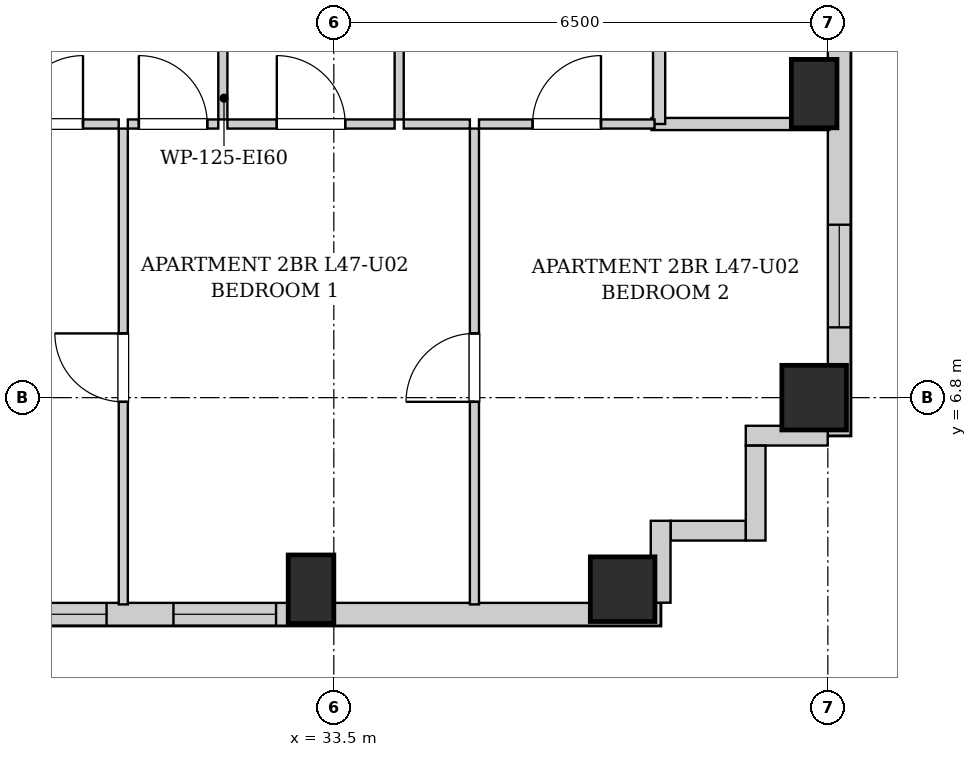
"""IFC4 building model, lengths in metres.
Left out: names, types, materials, properties, quantities, classifications, styles, units other than length and angle.
Written with IfcOpenShell. Run it as: python <this file> out.ifc"""

import sys

from ifc_helpers import new_model, si_unit, direction, frame, frame_2d, origin, origin_2d, place, context, subcontext, project, spatial, rectangle, extrude, element, fill, save


model = new_model("IFC4")
c1 = context("Model", 3, precision=1e-05, world=origin(), true_north=direction((0.0, 1.0)))
c2 = subcontext(c1, "Body", "Model", "MODEL_VIEW")
j1 = project(units=[si_unit("LENGTHUNIT", "METRE"), si_unit("PLANEANGLEUNIT", "RADIAN")], contexts=[c1])
p1 = place(None, origin())
s1 = spatial("IfcSite", under=j1, at=p1, CompositionType="ELEMENT")
p2 = place(p1, origin())
s2 = spatial("IfcBuilding", under=s1, at=p2, CompositionType="ELEMENT")
p3 = place(p2, frame((0.0, 0.0, 163.4)))
s3 = spatial("IfcBuildingStorey", under=s2, at=p3, CompositionType="ELEMENT", Elevation=163.4)
p4 = place(p3, frame((33.2, 4.28, 0.0), z_axis=(0.0, 0.0, 1.0), x_axis=(1.0, 0.0, 0.0)))
e1 = element("IfcColumn", 1, at=p4, inside=s3, PredefinedType="COLUMN", context=c2, shape_type="SweptSolid", body=[
    extrude(rectangle(XDim=0.6, YDim=0.9, at=origin_2d()), origin(), (0.0, 0.0, 1.0), 3.25),
])
for number, where, z_axis, x_axis in (
    (2, (37.3, 4.28, 0.0), (0.0, 0.0, 1.0), (1.0, 0.0, 0.0)),
    (3, (39.82, 6.8, 0.0), (0.0, 0.0, 1.0), (1.0, 0.0, 0.0)),
):
    element("IfcColumn", number, at=place(p3, frame(where, z_axis=z_axis, x_axis=x_axis)), inside=s3, PredefinedType="COLUMN", context=c2, shape_type="SweptSolid", body=[
        extrude(rectangle(XDim=0.85, YDim=0.85, at=origin_2d()), origin(), (0.0, 0.0, 1.0), 3.25),
    ])
p5 = place(p3, frame((39.82, 10.8, 0.0), z_axis=(0.0, 0.0, 1.0), x_axis=(1.0, 0.0, 0.0)))
e4 = element("IfcColumn", 4, at=p5, inside=s3, PredefinedType="COLUMN", context=c2, shape_type="SweptSolid", body=[
    extrude(rectangle(XDim=0.6, YDim=0.9, at=origin_2d()), origin(), (0.0, 0.0, 1.0), 3.25),
])
p6 = place(p3, frame((40.15, 40.8, 0.0), z_axis=(0.0, 0.0, 1.0), x_axis=(0.0, -1.0, 0.0)))
e5 = element("IfcWall", 5, at=p6, inside=s3, PredefinedType="SOLIDWALL", context=c2, shape_type="SweptSolid", body=[
    extrude(rectangle(XDim=34.5, YDim=0.3, at=frame_2d((17.25, 0.0))), origin(), (0.0, 0.0, 1.0), 2.99),
])
p7 = place(p6, frame((31.725, 0.0, 0.55)))
e6 = element("IfcOpeningElement", 6, at=p7, cuts=e5, PredefinedType="OPENING", context=c2, shape_type="SweptSolid", body=[
    extrude(rectangle(XDim=1.35, YDim=1.2, at=frame_2d((0.675, 0.6))), frame((0.0, 0.16, 0.0), z_axis=(0.0, -1.0, 0.0), x_axis=(1.0, 0.0, 0.0)), (0.0, 0.0, 1.0), 0.32),
])
p8 = place(p6, frame((3.0, 0.0, 0.55)))
e7 = element("IfcOpeningElement", 7, at=p8, cuts=e5, PredefinedType="OPENING", context=c2, shape_type="SweptSolid", body=[
    extrude(rectangle(XDim=1.35, YDim=1.2, at=frame_2d((0.675, 0.6))), frame((0.0, 0.16, 0.0), z_axis=(0.0, -1.0, 0.0), x_axis=(1.0, 0.0, 0.0)), (0.0, 0.0, 1.0), 0.32),
])
p9 = place(p6, frame((1.085, 0.0, 0.55)))
e8 = element("IfcOpeningElement", 8, at=p9, cuts=e5, PredefinedType="OPENING", context=c2, shape_type="SweptSolid", body=[
    extrude(rectangle(XDim=1.35, YDim=1.2, at=frame_2d((0.675, 0.6))), frame((0.0, 0.16, 0.0), z_axis=(0.0, -1.0, 0.0), x_axis=(1.0, 0.0, 0.0)), (0.0, 0.0, 1.0), 0.32),
])
p10 = place(p6, frame((21.3, 0.0, 0.55)))
e9 = element("IfcOpeningElement", 9, at=p10, cuts=e5, PredefinedType="OPENING", context=c2, shape_type="SweptSolid", body=[
    extrude(rectangle(XDim=1.35, YDim=1.2, at=frame_2d((0.675, 0.6))), frame((0.0, 0.16, 0.0), z_axis=(0.0, -1.0, 0.0), x_axis=(1.0, 0.0, 0.0)), (0.0, 0.0, 1.0), 0.32),
])
p11 = place(p6, frame((22.91, 0.0, 0.55)))
e10 = element("IfcOpeningElement", 10, at=p11, cuts=e5, PredefinedType="OPENING", context=c2, shape_type="SweptSolid", body=[
    extrude(rectangle(XDim=1.35, YDim=1.2, at=frame_2d((0.675, 0.6))), frame((0.0, 0.16, 0.0), z_axis=(0.0, -1.0, 0.0), x_axis=(1.0, 0.0, 0.0)), (0.0, 0.0, 1.0), 0.32),
])
p12 = place(p6, frame((14.175, 0.0, 0.55)))
e11 = element("IfcOpeningElement", 11, at=p12, cuts=e5, PredefinedType="OPENING", context=c2, shape_type="SweptSolid", body=[
    extrude(rectangle(XDim=1.35, YDim=1.2, at=frame_2d((0.675, 0.6))), frame((0.0, 0.16, 0.0), z_axis=(0.0, -1.0, 0.0), x_axis=(1.0, 0.0, 0.0)), (0.0, 0.0, 1.0), 0.32),
])
p13 = place(p6, frame((12.41, 0.0, 0.55)))
e12 = element("IfcOpeningElement", 12, at=p13, cuts=e5, PredefinedType="OPENING", context=c2, shape_type="SweptSolid", body=[
    extrude(rectangle(XDim=1.35, YDim=1.2, at=frame_2d((0.675, 0.6))), frame((0.0, 0.16, 0.0), z_axis=(0.0, -1.0, 0.0), x_axis=(1.0, 0.0, 0.0)), (0.0, 0.0, 1.0), 0.32),
])
p14 = place(p3, frame((37.8, 3.95, 0.0), z_axis=(0.0, 0.0, 1.0), x_axis=(-1.0, 0.0, 0.0)))
e13 = element("IfcWall", 13, at=p14, inside=s3, PredefinedType="SOLIDWALL", context=c2, shape_type="SweptSolid", body=[
    extrude(rectangle(XDim=20.15, YDim=0.3, at=frame_2d((10.075, 0.0))), origin(), (0.0, 0.0, 1.0), 2.99),
])
p15 = place(p14, frame((15.3, 0.0, 0.55)))
e14 = element("IfcOpeningElement", 14, at=p15, cuts=e13, PredefinedType="OPENING", context=c2, shape_type="SweptSolid", body=[
    extrude(rectangle(XDim=1.35, YDim=1.2, at=frame_2d((0.675, 0.6))), frame((0.0, 0.16, 0.0), z_axis=(0.0, -1.0, 0.0), x_axis=(1.0, 0.0, 0.0)), (0.0, 0.0, 1.0), 0.32),
])
p16 = place(p14, frame((16.91, 0.0, 0.55)))
e15 = element("IfcOpeningElement", 15, at=p16, cuts=e13, PredefinedType="OPENING", context=c2, shape_type="SweptSolid", body=[
    extrude(rectangle(XDim=1.35, YDim=1.2, at=frame_2d((0.675, 0.6))), frame((0.0, 0.16, 0.0), z_axis=(0.0, -1.0, 0.0), x_axis=(1.0, 0.0, 0.0)), (0.0, 0.0, 1.0), 0.32),
])
p17 = place(p14, frame((8.95, 0.0, 0.55)))
e16 = element("IfcOpeningElement", 16, at=p17, cuts=e13, PredefinedType="OPENING", context=c2, shape_type="SweptSolid", body=[
    extrude(rectangle(XDim=1.35, YDim=1.2, at=frame_2d((0.675, 0.6))), frame((0.0, 0.16, 0.0), z_axis=(0.0, -1.0, 0.0), x_axis=(1.0, 0.0, 0.0)), (0.0, 0.0, 1.0), 0.32),
])
p18 = place(p14, frame((7.29, 0.0, 0.55)))
e17 = element("IfcOpeningElement", 17, at=p18, cuts=e13, PredefinedType="OPENING", context=c2, shape_type="SweptSolid", body=[
    extrude(rectangle(XDim=1.35, YDim=1.2, at=frame_2d((0.675, 0.6))), frame((0.0, 0.16, 0.0), z_axis=(0.0, -1.0, 0.0), x_axis=(1.0, 0.0, 0.0)), (0.0, 0.0, 1.0), 0.32),
])
p19 = place(p14, frame((5.06, 0.0, 0.55)))
e18 = element("IfcOpeningElement", 18, at=p19, cuts=e13, PredefinedType="OPENING", context=c2, shape_type="SweptSolid", body=[
    extrude(rectangle(XDim=1.35, YDim=1.2, at=frame_2d((0.675, 0.6))), frame((0.0, 0.16, 0.0), z_axis=(0.0, -1.0, 0.0), x_axis=(1.0, 0.0, 0.0)), (0.0, 0.0, 1.0), 0.32),
])
p20 = place(p3, frame((39.998, 6.3, 0.0), z_axis=(0.0, 0.0, 1.0), x_axis=(-1.0, 0.0, 0.0)))
e19 = element("IfcWall", 19, at=p20, inside=s3, PredefinedType="SOLIDWALL", context=c2, shape_type="SweptSolid", body=[
    extrude(rectangle(XDim=1.078, YDim=0.26, at=frame_2d((0.539, 0.0))), origin(), (0.0, 0.0, 1.0), 2.99),
])
p21 = place(p3, frame((39.05, 6.168, 0.0), z_axis=(0.0, 0.0, 1.0), x_axis=(0.0, -1.0, 0.0)))
e20 = element("IfcWall", 20, at=p21, inside=s3, PredefinedType="SOLIDWALL", context=c2, shape_type="SweptSolid", body=[
    extrude(rectangle(XDim=1.248, YDim=0.26, at=frame_2d((0.624, 0.0))), origin(), (0.0, 0.0, 1.0), 2.99),
])
p22 = place(p3, frame((38.918, 5.05, 0.0), z_axis=(0.0, 0.0, 1.0), x_axis=(-1.0, 0.0, 0.0)))
e21 = element("IfcWall", 21, at=p22, inside=s3, PredefinedType="SOLIDWALL", context=c2, shape_type="SweptSolid", body=[
    extrude(rectangle(XDim=0.986, YDim=0.26, at=frame_2d((0.493, 0.0))), origin(), (0.0, 0.0, 1.0), 2.99),
])
p23 = place(p3, frame((37.8, 5.18, 0.0), z_axis=(0.0, 0.0, 1.0), x_axis=(0.0, -1.0, 0.0)))
e22 = element("IfcWall", 22, at=p23, inside=s3, PredefinedType="SOLIDWALL", context=c2, shape_type="SweptSolid", body=[
    extrude(rectangle(XDim=1.078, YDim=0.26, at=frame_2d((0.539, 0.0))), origin(), (0.0, 0.0, 1.0), 2.99),
])
p24 = place(p3, frame((37.68, 10.4, 0.0), z_axis=(0.0, 0.0, 1.0), x_axis=(1.0, 0.0, 0.0)))
e23 = element("IfcWall", 23, at=p24, inside=s3, PredefinedType="PARTITIONING", context=c2, shape_type="SweptSolid", body=[
    extrude(rectangle(XDim=2.34, YDim=0.16, at=frame_2d((1.17, 0.0))), origin(), (0.0, 0.0, 1.0), 2.99),
])
p25 = place(p3, frame((37.78, 10.4, 0.0), z_axis=(0.0, 0.0, 1.0), x_axis=(0.0, 1.0, 0.0)))
e24 = element("IfcWall", 24, at=p25, inside=s3, PredefinedType="PARTITIONING", context=c2, shape_type="SweptSolid", body=[
    extrude(rectangle(XDim=2.91, YDim=0.16, at=frame_2d((1.455, 0.0))), origin(), (0.0, 0.0, 1.0), 2.99),
])
p26 = place(p3, frame((32.04, 10.46, 0.0), z_axis=(0.0, 0.0, 1.0), x_axis=(0.0, 1.0, 0.0)))
e25 = element("IfcWall", 25, at=p26, inside=s3, PredefinedType="PARTITIONING", context=c2, shape_type="SweptSolid", body=[
    extrude(rectangle(XDim=2.85, YDim=0.12, at=frame_2d((1.425, 0.0))), origin(), (0.0, 0.0, 1.0), 2.99),
])
p27 = place(p26, frame((0.975, 0.0, 0.0)))
e26 = element("IfcOpeningElement", 26, at=p27, cuts=e25, PredefinedType="OPENING", context=c2, shape_type="SweptSolid", body=[
    extrude(rectangle(XDim=0.9, YDim=2.05, at=frame_2d((0.45, 1.025))), frame((0.0, 0.07, 0.0), z_axis=(0.0, -1.0, 0.0), x_axis=(1.0, 0.0, 0.0)), (0.0, 0.0, 1.0), 0.14),
])
p28 = place(p3, frame((28.83, 10.4, 0.0), z_axis=(0.0, 0.0, 1.0), x_axis=(1.0, 0.0, 0.0)))
e27 = element("IfcWall", 27, at=p28, inside=s3, PredefinedType="PARTITIONING", context=c2, shape_type="SweptSolid", body=[
    extrude(rectangle(XDim=1.84, YDim=0.12, at=frame_2d((0.92, 0.0))), origin(), (0.0, 0.0, 1.0), 2.99),
])
p29 = place(p28, frame((0.47, 0.0, 0.0)))
e28 = element("IfcOpeningElement", 28, at=p29, cuts=e27, PredefinedType="OPENING", context=c2, shape_type="SweptSolid", body=[
    extrude(rectangle(XDim=0.9, YDim=2.05, at=frame_2d((0.45, 1.025))), frame((0.0, 0.07, 0.0), z_axis=(0.0, -1.0, 0.0), x_axis=(1.0, 0.0, 0.0)), (0.0, 0.0, 1.0), 0.14),
])
p30 = place(p3, frame((30.79, 10.4, 0.0), z_axis=(0.0, 0.0, 1.0), x_axis=(1.0, 0.0, 0.0)))
e29 = element("IfcWall", 29, at=p30, inside=s3, PredefinedType="PARTITIONING", context=c2, shape_type="SweptSolid", body=[
    extrude(rectangle(XDim=1.19, YDim=0.12, at=frame_2d((0.595, 0.0))), origin(), (0.0, 0.0, 1.0), 2.99),
])
p31 = place(p30, frame((0.145, 0.0, 0.0)))
e30 = element("IfcOpeningElement", 30, at=p31, cuts=e29, PredefinedType="OPENING", context=c2, shape_type="SweptSolid", body=[
    extrude(rectangle(XDim=0.9, YDim=2.05, at=frame_2d((0.45, 1.025))), frame((0.0, 0.07, 0.0), z_axis=(0.0, -1.0, 0.0), x_axis=(1.0, 0.0, 0.0)), (0.0, 0.0, 1.0), 0.14),
])
p32 = place(p3, frame((34.36, 10.46, 0.0), z_axis=(0.0, 0.0, 1.0), x_axis=(0.0, 1.0, 0.0)))
e31 = element("IfcWall", 31, at=p32, inside=s3, PredefinedType="PARTITIONING", context=c2, shape_type="SweptSolid", body=[
    extrude(rectangle(XDim=2.85, YDim=0.12, at=frame_2d((1.425, 0.0))), origin(), (0.0, 0.0, 1.0), 2.99),
])
p33 = place(p32, frame((0.975, 0.0, 0.0)))
e32 = element("IfcOpeningElement", 32, at=p33, cuts=e31, PredefinedType="OPENING", context=c2, shape_type="SweptSolid", body=[
    extrude(rectangle(XDim=0.9, YDim=2.05, at=frame_2d((0.45, 1.025))), frame((0.0, 0.07, 0.0), z_axis=(0.0, -1.0, 0.0), x_axis=(1.0, 0.0, 0.0)), (0.0, 0.0, 1.0), 0.14),
])
p34 = place(p3, frame((32.1, 10.4, 0.0), z_axis=(0.0, 0.0, 1.0), x_axis=(1.0, 0.0, 0.0)))
e33 = element("IfcWall", 33, at=p34, inside=s3, PredefinedType="PARTITIONING", context=c2, shape_type="SweptSolid", body=[
    extrude(rectangle(XDim=2.2, YDim=0.12, at=frame_2d((1.1, 0.0))), origin(), (0.0, 0.0, 1.0), 2.99),
])
p35 = place(p34, frame((0.65, 0.0, 0.0)))
e34 = element("IfcOpeningElement", 34, at=p35, cuts=e33, PredefinedType="OPENING", context=c2, shape_type="SweptSolid", body=[
    extrude(rectangle(XDim=0.9, YDim=2.05, at=frame_2d((0.45, 1.025))), frame((0.0, 0.07, 0.0), z_axis=(0.0, -1.0, 0.0), x_axis=(1.0, 0.0, 0.0)), (0.0, 0.0, 1.0), 0.14),
])
p36 = place(p3, frame((34.42, 10.4, 0.0), z_axis=(0.0, 0.0, 1.0), x_axis=(1.0, 0.0, 0.0)))
e35 = element("IfcWall", 35, at=p36, inside=s3, PredefinedType="PARTITIONING", context=c2, shape_type="SweptSolid", body=[
    extrude(rectangle(XDim=0.87, YDim=0.12, at=frame_2d((0.435, 0.0))), origin(), (0.0, 0.0, 1.0), 2.99),
])
p37 = place(p3, frame((35.41, 10.4, 0.0), z_axis=(0.0, 0.0, 1.0), x_axis=(1.0, 0.0, 0.0)))
e36 = element("IfcWall", 36, at=p37, inside=s3, PredefinedType="PARTITIONING", context=c2, shape_type="SweptSolid", body=[
    extrude(rectangle(XDim=2.31, YDim=0.12, at=frame_2d((1.155, 0.0))), origin(), (0.0, 0.0, 1.0), 2.99),
])
p38 = place(p37, frame((0.705, 0.0, 0.0)))
e37 = element("IfcOpeningElement", 37, at=p38, cuts=e36, PredefinedType="OPENING", context=c2, shape_type="SweptSolid", body=[
    extrude(rectangle(XDim=0.9, YDim=2.05, at=frame_2d((0.45, 1.025))), frame((0.0, 0.07, 0.0), z_axis=(0.0, -1.0, 0.0), x_axis=(1.0, 0.0, 0.0)), (0.0, 0.0, 1.0), 0.14),
])
p39 = place(p3, frame((30.73, 4.08, 0.0), z_axis=(0.0, 0.0, 1.0), x_axis=(0.0, 1.0, 0.0)))
e38 = element("IfcWall", 38, at=p39, inside=s3, PredefinedType="PARTITIONING", context=c2, shape_type="SweptSolid", body=[
    extrude(rectangle(XDim=6.26, YDim=0.12, at=frame_2d((3.13, 0.0))), origin(), (0.0, 0.0, 1.0), 2.99),
])
p40 = place(p39, frame((2.665, 0.0, 0.0)))
e39 = element("IfcOpeningElement", 39, at=p40, cuts=e38, PredefinedType="OPENING", context=c2, shape_type="SweptSolid", body=[
    extrude(rectangle(XDim=0.9, YDim=2.05, at=frame_2d((0.45, 1.025))), frame((0.0, 0.07, 0.0), z_axis=(0.0, -1.0, 0.0), x_axis=(1.0, 0.0, 0.0)), (0.0, 0.0, 1.0), 0.14),
])
p41 = place(p3, frame((35.35, 4.08, 0.0), z_axis=(0.0, 0.0, 1.0), x_axis=(0.0, 1.0, 0.0)))
e40 = element("IfcWall", 40, at=p41, inside=s3, PredefinedType="PARTITIONING", context=c2, shape_type="SweptSolid", body=[
    extrude(rectangle(XDim=6.26, YDim=0.12, at=frame_2d((3.13, 0.0))), origin(), (0.0, 0.0, 1.0), 2.99),
])
p42 = place(p41, frame((2.665, 0.0, 0.0)))
e41 = element("IfcOpeningElement", 41, at=p42, cuts=e40, PredefinedType="OPENING", context=c2, shape_type="SweptSolid", body=[
    extrude(rectangle(XDim=0.9, YDim=2.05, at=frame_2d((0.45, 1.025))), frame((0.0, 0.07, 0.0), z_axis=(0.0, -1.0, 0.0), x_axis=(1.0, 0.0, 0.0)), (0.0, 0.0, 1.0), 0.14),
])
p43 = place(p29, origin())
e42 = element("IfcDoor", 42, at=p43, inside=s3, OperationType="SINGLE_SWING_RIGHT", PredefinedType="DOOR", context=c2, shape_type="SweptSolid", body=[
    extrude(rectangle(XDim=0.9, YDim=2.05, at=frame_2d((0.45, 1.025))), frame((0.0, 0.025, 0.0), z_axis=(0.0, -1.0, 0.0), x_axis=(1.0, 0.0, 0.0)), (0.0, 0.0, 1.0), 0.05),
])
fill(e28, e42)
p44 = place(p31, origin())
e43 = element("IfcDoor", 43, at=p44, inside=s3, OperationType="SINGLE_SWING_LEFT", PredefinedType="DOOR", context=c2, shape_type="SweptSolid", body=[
    extrude(rectangle(XDim=0.9, YDim=2.05, at=frame_2d((0.45, 1.025))), frame((0.0, 0.025, 0.0), z_axis=(0.0, -1.0, 0.0), x_axis=(1.0, 0.0, 0.0)), (0.0, 0.0, 1.0), 0.05),
])
fill(e30, e43)
p45 = place(p35, origin())
e44 = element("IfcDoor", 44, at=p45, inside=s3, OperationType="SINGLE_SWING_LEFT", PredefinedType="DOOR", context=c2, shape_type="SweptSolid", body=[
    extrude(rectangle(XDim=0.9, YDim=2.05, at=frame_2d((0.45, 1.025))), frame((0.0, 0.025, 0.0), z_axis=(0.0, -1.0, 0.0), x_axis=(1.0, 0.0, 0.0)), (0.0, 0.0, 1.0), 0.05),
])
fill(e34, e44)
p46 = place(p38, origin())
e45 = element("IfcDoor", 45, at=p46, inside=s3, OperationType="SINGLE_SWING_RIGHT", PredefinedType="DOOR", context=c2, shape_type="SweptSolid", body=[
    extrude(rectangle(XDim=0.9, YDim=2.05, at=frame_2d((0.45, 1.025))), frame((0.0, 0.025, 0.0), z_axis=(0.0, -1.0, 0.0), x_axis=(1.0, 0.0, 0.0)), (0.0, 0.0, 1.0), 0.05),
])
fill(e37, e45)
p47 = place(p40, origin())
e46 = element("IfcDoor", 46, at=p47, inside=s3, OperationType="SINGLE_SWING_RIGHT", PredefinedType="DOOR", context=c2, shape_type="SweptSolid", body=[
    extrude(rectangle(XDim=0.9, YDim=2.05, at=frame_2d((0.45, 1.025))), frame((0.0, 0.025, 0.0), z_axis=(0.0, -1.0, 0.0), x_axis=(1.0, 0.0, 0.0)), (0.0, 0.0, 1.0), 0.05),
])
fill(e39, e46)
p48 = place(p42, origin())
e47 = element("IfcDoor", 47, at=p48, inside=s3, OperationType="SINGLE_SWING_LEFT", PredefinedType="DOOR", context=c2, shape_type="SweptSolid", body=[
    extrude(rectangle(XDim=0.9, YDim=2.05, at=frame_2d((0.45, 1.025))), frame((0.0, 0.025, 0.0), z_axis=(0.0, -1.0, 0.0), x_axis=(1.0, 0.0, 0.0)), (0.0, 0.0, 1.0), 0.05),
])
fill(e41, e47)
p49 = place(p18, origin())
e48 = element("IfcWindow", 48, at=p49, inside=s3, PartitioningType="SINGLE_PANEL", PredefinedType="WINDOW", context=c2, shape_type="SweptSolid", body=[
    extrude(rectangle(XDim=1.35, YDim=1.2, at=frame_2d((0.675, 0.6))), frame((0.0, 0.03, 0.0), z_axis=(0.0, -1.0, 0.0), x_axis=(1.0, 0.0, 0.0)), (0.0, 0.0, 1.0), 0.06),
])
fill(e17, e48)
p50 = place(p19, origin())
e49 = element("IfcWindow", 49, at=p50, inside=s3, PartitioningType="SINGLE_PANEL", PredefinedType="WINDOW", context=c2, shape_type="SweptSolid", body=[
    extrude(rectangle(XDim=1.35, YDim=1.2, at=frame_2d((0.675, 0.6))), frame((0.0, 0.03, 0.0), z_axis=(0.0, -1.0, 0.0), x_axis=(1.0, 0.0, 0.0)), (0.0, 0.0, 1.0), 0.06),
])
fill(e18, e49)
p51 = place(p7, origin())
e50 = element("IfcWindow", 50, at=p51, inside=s3, PartitioningType="SINGLE_PANEL", PredefinedType="WINDOW", context=c2, shape_type="SweptSolid", body=[
    extrude(rectangle(XDim=1.35, YDim=1.2, at=frame_2d((0.675, 0.6))), frame((0.0, 0.03, 0.0), z_axis=(0.0, -1.0, 0.0), x_axis=(1.0, 0.0, 0.0)), (0.0, 0.0, 1.0), 0.06),
])
fill(e6, e50)
save(model, sys.argv[1])
